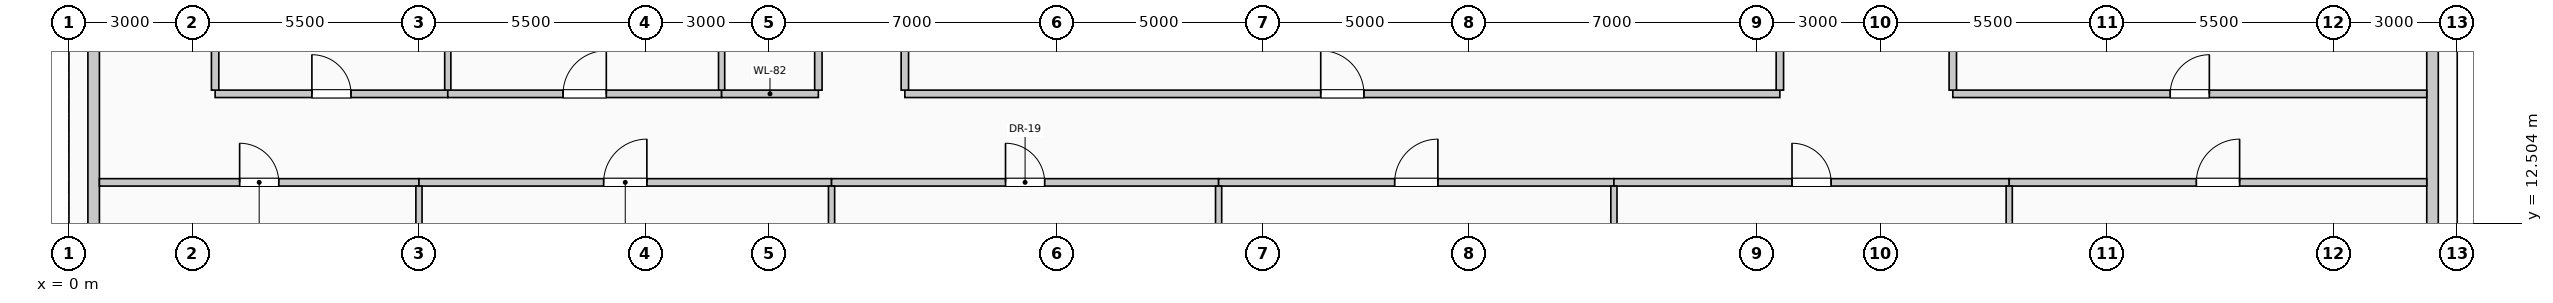
"""IFC4 building model, lengths in metres.
Left out: names, types, materials, properties, quantities, classifications, styles, units other than length and angle.
Written with IfcOpenShell. Run it as: python <this file> out.ifc"""

import sys

from ifc_helpers import new_model, si_unit, direction, frame, frame_2d, origin, place, context, subcontext, project, spatial, rectangle, extrude, element, fill, save


model = new_model("IFC4")
c1 = context("Model", 3, precision=1e-05, world=origin(), true_north=direction((0.0, 1.0)))
c2 = subcontext(c1, "Body", "Model", "MODEL_VIEW")
j1 = project(units=[si_unit("LENGTHUNIT", "METRE"), si_unit("PLANEANGLEUNIT", "RADIAN")], contexts=[c1])
p1 = place(None, origin())
s1 = spatial("IfcSite", under=j1, at=p1, CompositionType="ELEMENT")
p2 = place(p1, origin())
s2 = spatial("IfcBuilding", under=s1, at=p2, CompositionType="ELEMENT")
p3 = place(p2, frame((0.0, 0.0, 104.6)))
s3 = spatial("IfcBuildingStorey", under=s2, at=p3, CompositionType="ELEMENT", Elevation=104.6)
for number, where, z_axis, x_axis in (
    (1, (0.6, 10.445, 0.0), (0.0, 0.0, 1.0), (0.0, 1.0, 0.0)),
    (2, (57.4, 17.555, 0.0), (0.0, 0.0, 1.0), (0.0, -1.0, 0.0)),
):
    element("IfcWall", number, at=place(p3, frame(where, z_axis=z_axis, x_axis=x_axis)), inside=s3, PredefinedType="SOLIDWALL", context=c2, shape_type="SweptSolid", body=[
        extrude(rectangle(XDim=7.11, YDim=0.28, at=frame_2d((3.555, 0.0))), origin(), (0.0, 0.0, 1.0), 2.875),
    ])
p4 = place(p3, frame((0.74, 13.5, 0.0), z_axis=(0.0, 0.0, 1.0), x_axis=(1.0, 0.0, 0.0)))
e3 = element("IfcWall", 3, at=p4, inside=s3, PredefinedType="PARTITIONING", context=c2, shape_type="SweptSolid", body=[
    extrude(rectangle(XDim=7.76, YDim=0.18, at=frame_2d((3.88, 0.0))), origin(), (0.0, 0.0, 1.0), 3.725),
])
p5 = place(p4, frame((3.405, 0.0, 0.0)))
e4 = element("IfcOpeningElement", 4, at=p5, cuts=e3, PredefinedType="OPENING", context=c2, shape_type="SweptSolid", body=[
    extrude(rectangle(XDim=0.95, YDim=2.15, at=frame_2d((0.475, 1.075))), frame((0.0, 0.1, 0.0), z_axis=(0.0, -1.0, 0.0), x_axis=(1.0, 0.0, 0.0)), (0.0, 0.0, 1.0), 0.2),
])
p6 = place(p3, frame((8.5, 13.5, 0.0), z_axis=(0.0, 0.0, 1.0), x_axis=(1.0, 0.0, 0.0)))
e5 = element("IfcWall", 5, at=p6, inside=s3, PredefinedType="PARTITIONING", context=c2, shape_type="SweptSolid", body=[
    extrude(rectangle(XDim=10.02, YDim=0.18, at=frame_2d((5.01, 0.0))), origin(), (0.0, 0.0, 1.0), 3.725),
])
p7 = place(p6, frame((4.485, 0.0, 0.0)))
e6 = element("IfcOpeningElement", 6, at=p7, cuts=e5, PredefinedType="OPENING", context=c2, shape_type="SweptSolid", body=[
    extrude(rectangle(XDim=1.05, YDim=2.15, at=frame_2d((0.525, 1.075))), frame((0.0, 0.1, 0.0), z_axis=(0.0, -1.0, 0.0), x_axis=(1.0, 0.0, 0.0)), (0.0, 0.0, 1.0), 0.2),
])
p8 = place(p3, frame((18.52, 13.5, 0.0), z_axis=(0.0, 0.0, 1.0), x_axis=(1.0, 0.0, 0.0)))
e7 = element("IfcWall", 7, at=p8, inside=s3, PredefinedType="PARTITIONING", context=c2, shape_type="SweptSolid", body=[
    extrude(rectangle(XDim=9.4, YDim=0.18, at=frame_2d((4.7, 0.0))), origin(), (0.0, 0.0, 1.0), 3.725),
])
p9 = place(p8, frame((4.225, 0.0, 0.0)))
e8 = element("IfcOpeningElement", 8, at=p9, cuts=e7, PredefinedType="OPENING", context=c2, shape_type="SweptSolid", body=[
    extrude(rectangle(XDim=0.95, YDim=2.15, at=frame_2d((0.475, 1.075))), frame((0.0, 0.1, 0.0), z_axis=(0.0, -1.0, 0.0), x_axis=(1.0, 0.0, 0.0)), (0.0, 0.0, 1.0), 0.2),
])
p10 = place(p3, frame((27.92, 13.5, 0.0), z_axis=(0.0, 0.0, 1.0), x_axis=(1.0, 0.0, 0.0)))
e9 = element("IfcWall", 9, at=p10, inside=s3, PredefinedType="PARTITIONING", context=c2, shape_type="SweptSolid", body=[
    extrude(rectangle(XDim=9.6, YDim=0.18, at=frame_2d((4.8, 0.0))), origin(), (0.0, 0.0, 1.0), 3.725),
])
p11 = place(p10, frame((4.275, 0.0, 0.0)))
e10 = element("IfcOpeningElement", 10, at=p11, cuts=e9, PredefinedType="OPENING", context=c2, shape_type="SweptSolid", body=[
    extrude(rectangle(XDim=1.05, YDim=2.15, at=frame_2d((0.525, 1.075))), frame((0.0, 0.1, 0.0), z_axis=(0.0, -1.0, 0.0), x_axis=(1.0, 0.0, 0.0)), (0.0, 0.0, 1.0), 0.2),
])
p12 = place(p3, frame((37.52, 13.5, 0.0), z_axis=(0.0, 0.0, 1.0), x_axis=(1.0, 0.0, 0.0)))
e11 = element("IfcWall", 11, at=p12, inside=s3, PredefinedType="PARTITIONING", context=c2, shape_type="SweptSolid", body=[
    extrude(rectangle(XDim=9.6, YDim=0.18, at=frame_2d((4.8, 0.0))), origin(), (0.0, 0.0, 1.0), 3.725),
])
p13 = place(p12, frame((4.325, 0.0, 0.0)))
e12 = element("IfcOpeningElement", 12, at=p13, cuts=e11, PredefinedType="OPENING", context=c2, shape_type="SweptSolid", body=[
    extrude(rectangle(XDim=0.95, YDim=2.15, at=frame_2d((0.475, 1.075))), frame((0.0, 0.1, 0.0), z_axis=(0.0, -1.0, 0.0), x_axis=(1.0, 0.0, 0.0)), (0.0, 0.0, 1.0), 0.2),
])
p14 = place(p3, frame((47.12, 13.5, 0.0), z_axis=(0.0, 0.0, 1.0), x_axis=(1.0, 0.0, 0.0)))
e13 = element("IfcWall", 13, at=p14, inside=s3, PredefinedType="PARTITIONING", context=c2, shape_type="SweptSolid", body=[
    extrude(rectangle(XDim=10.14, YDim=0.18, at=frame_2d((5.07, 0.0))), origin(), (0.0, 0.0, 1.0), 3.725),
])
p15 = place(p14, frame((4.545, 0.0, 0.0)))
e14 = element("IfcOpeningElement", 14, at=p15, cuts=e13, PredefinedType="OPENING", context=c2, shape_type="SweptSolid", body=[
    extrude(rectangle(XDim=1.05, YDim=2.15, at=frame_2d((0.525, 1.075))), frame((0.0, 0.1, 0.0), z_axis=(0.0, -1.0, 0.0), x_axis=(1.0, 0.0, 0.0)), (0.0, 0.0, 1.0), 0.2),
])
p16 = place(p3, frame((3.55, 15.65, 0.0), z_axis=(0.0, 0.0, 1.0), x_axis=(1.0, 0.0, 0.0)))
e15 = element("IfcWall", 15, at=p16, inside=s3, PredefinedType="PARTITIONING", context=c2, shape_type="SweptSolid", body=[
    extrude(rectangle(XDim=5.65, YDim=0.18, at=frame_2d((2.825, 0.0))), origin(), (0.0, 0.0, 1.0), 3.725),
])
p17 = place(p16, frame((2.35, 0.0, 0.0)))
e16 = element("IfcOpeningElement", 16, at=p17, cuts=e15, PredefinedType="OPENING", context=c2, shape_type="SweptSolid", body=[
    extrude(rectangle(XDim=0.95, YDim=2.15, at=frame_2d((0.475, 1.075))), frame((0.0, 0.1, 0.0), z_axis=(0.0, -1.0, 0.0), x_axis=(1.0, 0.0, 0.0)), (0.0, 0.0, 1.0), 0.2),
])
p18 = place(p3, frame((9.2, 15.65, 0.0), z_axis=(0.0, 0.0, 1.0), x_axis=(1.0, 0.0, 0.0)))
e17 = element("IfcWall", 17, at=p18, inside=s3, PredefinedType="PARTITIONING", context=c2, shape_type="SweptSolid", body=[
    extrude(rectangle(XDim=6.65, YDim=0.18, at=frame_2d((3.325, 0.0))), origin(), (0.0, 0.0, 1.0), 3.725),
])
p19 = place(p18, frame((2.8, 0.0, 0.0)))
e18 = element("IfcOpeningElement", 18, at=p19, cuts=e17, PredefinedType="OPENING", context=c2, shape_type="SweptSolid", body=[
    extrude(rectangle(XDim=1.05, YDim=2.15, at=frame_2d((0.525, 1.075))), frame((0.0, 0.1, 0.0), z_axis=(0.0, -1.0, 0.0), x_axis=(1.0, 0.0, 0.0)), (0.0, 0.0, 1.0), 0.2),
])
p20 = place(p3, frame((15.85, 15.65, 0.0), z_axis=(0.0, 0.0, 1.0), x_axis=(1.0, 0.0, 0.0)))
e19 = element("IfcWall", 19, at=p20, inside=s3, PredefinedType="PARTITIONING", context=c2, shape_type="SweptSolid", body=[
    extrude(rectangle(XDim=2.35, YDim=0.18, at=frame_2d((1.175, 0.0))), origin(), (0.0, 0.0, 1.0), 3.725),
])
p21 = place(p3, frame((20.3, 15.65, 0.0), z_axis=(0.0, 0.0, 1.0), x_axis=(1.0, 0.0, 0.0)))
e20 = element("IfcWall", 20, at=p21, inside=s3, PredefinedType="PARTITIONING", context=c2, shape_type="SweptSolid", body=[
    extrude(rectangle(XDim=21.25, YDim=0.18, at=frame_2d((10.625, 0.0))), origin(), (0.0, 0.0, 1.0), 3.725),
])
p22 = place(p21, frame((10.1, 0.0, 0.0)))
e21 = element("IfcOpeningElement", 21, at=p22, cuts=e20, PredefinedType="OPENING", context=c2, shape_type="SweptSolid", body=[
    extrude(rectangle(XDim=1.05, YDim=2.15, at=frame_2d((0.525, 1.075))), frame((0.0, 0.1, 0.0), z_axis=(0.0, -1.0, 0.0), x_axis=(1.0, 0.0, 0.0)), (0.0, 0.0, 1.0), 0.2),
])
p23 = place(p3, frame((45.75, 15.65, 0.0), z_axis=(0.0, 0.0, 1.0), x_axis=(1.0, 0.0, 0.0)))
e22 = element("IfcWall", 22, at=p23, inside=s3, PredefinedType="PARTITIONING", context=c2, shape_type="SweptSolid", body=[
    extrude(rectangle(XDim=11.51, YDim=0.18, at=frame_2d((5.755, 0.0))), origin(), (0.0, 0.0, 1.0), 3.725),
])
p24 = place(p23, frame((5.28, 0.0, 0.0)))
e23 = element("IfcOpeningElement", 23, at=p24, cuts=e22, PredefinedType="OPENING", context=c2, shape_type="SweptSolid", body=[
    extrude(rectangle(XDim=0.95, YDim=2.15, at=frame_2d((0.475, 1.075))), frame((0.0, 0.1, 0.0), z_axis=(0.0, -1.0, 0.0), x_axis=(1.0, 0.0, 0.0)), (0.0, 0.0, 1.0), 0.2),
])
p25 = place(p3, frame((3.55, 15.74, 0.0), z_axis=(0.0, 0.0, 1.0), x_axis=(0.0, 1.0, 0.0)))
e24 = element("IfcWall", 24, at=p25, inside=s3, PredefinedType="PARTITIONING", context=c2, shape_type="SweptSolid", body=[
    extrude(rectangle(XDim=3.135, YDim=0.18, at=frame_2d((1.567, 0.0))), origin(), (0.0, 0.0, 1.0), 3.725),
])
p26 = place(p3, frame((8.5, 1.175, 0.0), z_axis=(0.0, 0.0, 1.0), x_axis=(0.0, 1.0, 0.0)))
e25 = element("IfcWall", 25, at=p26, inside=s3, PredefinedType="PARTITIONING", context=c2, shape_type="SweptSolid", body=[
    extrude(rectangle(XDim=12.235, YDim=0.15, at=frame_2d((6.117, 0.0))), origin(), (0.0, 0.0, 1.0), 3.725),
])
p27 = place(p3, frame((9.2, 15.74, 0.0), z_axis=(0.0, 0.0, 1.0), x_axis=(0.0, 1.0, 0.0)))
e26 = element("IfcWall", 26, at=p27, inside=s3, PredefinedType="PARTITIONING", context=c2, shape_type="SweptSolid", body=[
    extrude(rectangle(XDim=3.135, YDim=0.15, at=frame_2d((1.567, 0.0))), origin(), (0.0, 0.0, 1.0), 3.725),
])
p28 = place(p3, frame((15.85, 15.74, 0.0), z_axis=(0.0, 0.0, 1.0), x_axis=(0.0, 1.0, 0.0)))
e27 = element("IfcWall", 27, at=p28, inside=s3, PredefinedType="PARTITIONING", context=c2, shape_type="SweptSolid", body=[
    extrude(rectangle(XDim=1.76, YDim=0.15, at=frame_2d((0.88, 0.0))), origin(), (0.0, 0.0, 1.0), 3.725),
])
p29 = place(p3, frame((18.2, 15.74, 0.0), z_axis=(0.0, 0.0, 1.0), x_axis=(0.0, 1.0, 0.0)))
e28 = element("IfcWall", 28, at=p29, inside=s3, PredefinedType="PARTITIONING", context=c2, shape_type="SweptSolid", body=[
    extrude(rectangle(XDim=14.37, YDim=0.18, at=frame_2d((7.185, 0.0))), origin(), (0.0, 0.0, 1.0), 3.725),
])
p30 = place(p3, frame((18.52, 0.74, 0.0), z_axis=(0.0, 0.0, 1.0), x_axis=(0.0, 1.0, 0.0)))
e29 = element("IfcWall", 29, at=p30, inside=s3, PredefinedType="PARTITIONING", context=c2, shape_type="SweptSolid", body=[
    extrude(rectangle(XDim=12.67, YDim=0.15, at=frame_2d((6.335, 0.0))), origin(), (0.0, 0.0, 1.0), 3.725),
])
p31 = place(p3, frame((20.3, 15.74, 0.0), z_axis=(0.0, 0.0, 1.0), x_axis=(0.0, 1.0, 0.0)))
e30 = element("IfcWall", 30, at=p31, inside=s3, PredefinedType="PARTITIONING", context=c2, shape_type="SweptSolid", body=[
    extrude(rectangle(XDim=14.37, YDim=0.18, at=frame_2d((7.185, 0.0))), origin(), (0.0, 0.0, 1.0), 3.725),
])
for number, where, z_axis, x_axis in (
    (31, (27.92, 0.74, 0.0), (0.0, 0.0, 1.0), (0.0, 1.0, 0.0)),
    (32, (37.52, 0.74, 0.0), (0.0, 0.0, 1.0), (0.0, 1.0, 0.0)),
):
    element("IfcWall", number, at=place(p3, frame(where, z_axis=z_axis, x_axis=x_axis)), inside=s3, PredefinedType="PARTITIONING", context=c2, shape_type="SweptSolid", body=[
        extrude(rectangle(XDim=12.67, YDim=0.15, at=frame_2d((6.335, 0.0))), origin(), (0.0, 0.0, 1.0), 3.725),
    ])
p32 = place(p3, frame((41.55, 15.74, 0.0), z_axis=(0.0, 0.0, 1.0), x_axis=(0.0, 1.0, 0.0)))
e33 = element("IfcWall", 33, at=p32, inside=s3, PredefinedType="PARTITIONING", context=c2, shape_type="SweptSolid", body=[
    extrude(rectangle(XDim=1.76, YDim=0.18, at=frame_2d((0.88, 0.0))), origin(), (0.0, 0.0, 1.0), 3.07),
])
p33 = place(p3, frame((45.75, 15.74, 0.0), z_axis=(0.0, 0.0, 1.0), x_axis=(0.0, 1.0, 0.0)))
e34 = element("IfcWall", 34, at=p33, inside=s3, PredefinedType="PARTITIONING", context=c2, shape_type="SweptSolid", body=[
    extrude(rectangle(XDim=9.335, YDim=0.18, at=frame_2d((4.667, 0.0))), origin(), (0.0, 0.0, 1.0), 3.725),
])
p34 = place(p3, frame((47.12, 0.74, 0.0), z_axis=(0.0, 0.0, 1.0), x_axis=(0.0, 1.0, 0.0)))
e35 = element("IfcWall", 35, at=p34, inside=s3, PredefinedType="PARTITIONING", context=c2, shape_type="SweptSolid", body=[
    extrude(rectangle(XDim=12.67, YDim=0.15, at=frame_2d((6.335, 0.0))), origin(), (0.0, 0.0, 1.0), 3.725),
])
p35 = place(p5, origin())
e36 = element("IfcDoor", 36, at=p35, inside=s3, OperationType="SINGLE_SWING_LEFT", PredefinedType="DOOR", context=c2, shape_type="SweptSolid", body=[
    extrude(rectangle(XDim=0.95, YDim=2.15, at=frame_2d((0.475, 1.075))), frame((0.0, 0.025, 0.0), z_axis=(0.0, -1.0, 0.0), x_axis=(1.0, 0.0, 0.0)), (0.0, 0.0, 1.0), 0.05),
])
fill(e4, e36)
p36 = place(p7, origin())
e37 = element("IfcDoor", 37, at=p36, inside=s3, OperationType="SINGLE_SWING_RIGHT", PredefinedType="DOOR", context=c2, shape_type="SweptSolid", body=[
    extrude(rectangle(XDim=1.05, YDim=2.15, at=frame_2d((0.525, 1.075))), frame((0.0, 0.025, 0.0), z_axis=(0.0, -1.0, 0.0), x_axis=(1.0, 0.0, 0.0)), (0.0, 0.0, 1.0), 0.05),
])
fill(e6, e37)
p37 = place(p9, origin())
e38 = element("IfcDoor", 38, at=p37, inside=s3, OperationType="SINGLE_SWING_LEFT", PredefinedType="DOOR", context=c2, shape_type="SweptSolid", body=[
    extrude(rectangle(XDim=0.95, YDim=2.15, at=frame_2d((0.475, 1.075))), frame((0.0, 0.025, 0.0), z_axis=(0.0, -1.0, 0.0), x_axis=(1.0, 0.0, 0.0)), (0.0, 0.0, 1.0), 0.05),
])
fill(e8, e38)
p38 = place(p11, origin())
e39 = element("IfcDoor", 39, at=p38, inside=s3, OperationType="SINGLE_SWING_RIGHT", PredefinedType="DOOR", context=c2, shape_type="SweptSolid", body=[
    extrude(rectangle(XDim=1.05, YDim=2.15, at=frame_2d((0.525, 1.075))), frame((0.0, 0.025, 0.0), z_axis=(0.0, -1.0, 0.0), x_axis=(1.0, 0.0, 0.0)), (0.0, 0.0, 1.0), 0.05),
])
fill(e10, e39)
p39 = place(p13, origin())
e40 = element("IfcDoor", 40, at=p39, inside=s3, OperationType="SINGLE_SWING_LEFT", PredefinedType="DOOR", context=c2, shape_type="SweptSolid", body=[
    extrude(rectangle(XDim=0.95, YDim=2.15, at=frame_2d((0.475, 1.075))), frame((0.0, 0.025, 0.0), z_axis=(0.0, -1.0, 0.0), x_axis=(1.0, 0.0, 0.0)), (0.0, 0.0, 1.0), 0.05),
])
fill(e12, e40)
p40 = place(p15, origin())
e41 = element("IfcDoor", 41, at=p40, inside=s3, OperationType="SINGLE_SWING_RIGHT", PredefinedType="DOOR", context=c2, shape_type="SweptSolid", body=[
    extrude(rectangle(XDim=1.05, YDim=2.15, at=frame_2d((0.525, 1.075))), frame((0.0, 0.025, 0.0), z_axis=(0.0, -1.0, 0.0), x_axis=(1.0, 0.0, 0.0)), (0.0, 0.0, 1.0), 0.05),
])
fill(e14, e41)
p41 = place(p17, origin())
e42 = element("IfcDoor", 42, at=p41, inside=s3, OperationType="SINGLE_SWING_LEFT", PredefinedType="DOOR", context=c2, shape_type="SweptSolid", body=[
    extrude(rectangle(XDim=0.95, YDim=2.15, at=frame_2d((0.475, 1.075))), frame((0.0, 0.025, 0.0), z_axis=(0.0, -1.0, 0.0), x_axis=(1.0, 0.0, 0.0)), (0.0, 0.0, 1.0), 0.05),
])
fill(e16, e42)
p42 = place(p19, origin())
e43 = element("IfcDoor", 43, at=p42, inside=s3, OperationType="SINGLE_SWING_RIGHT", PredefinedType="DOOR", context=c2, shape_type="SweptSolid", body=[
    extrude(rectangle(XDim=1.05, YDim=2.15, at=frame_2d((0.525, 1.075))), frame((0.0, 0.025, 0.0), z_axis=(0.0, -1.0, 0.0), x_axis=(1.0, 0.0, 0.0)), (0.0, 0.0, 1.0), 0.05),
])
fill(e18, e43)
p43 = place(p22, origin())
e44 = element("IfcDoor", 44, at=p43, inside=s3, OperationType="SINGLE_SWING_LEFT", PredefinedType="DOOR", context=c2, shape_type="SweptSolid", body=[
    extrude(rectangle(XDim=1.05, YDim=2.15, at=frame_2d((0.525, 1.075))), frame((0.0, 0.025, 0.0), z_axis=(0.0, -1.0, 0.0), x_axis=(1.0, 0.0, 0.0)), (0.0, 0.0, 1.0), 0.05),
])
fill(e21, e44)
p44 = place(p24, origin())
e45 = element("IfcDoor", 45, at=p44, inside=s3, OperationType="SINGLE_SWING_RIGHT", PredefinedType="DOOR", context=c2, shape_type="SweptSolid", body=[
    extrude(rectangle(XDim=0.95, YDim=2.15, at=frame_2d((0.475, 1.075))), frame((0.0, 0.025, 0.0), z_axis=(0.0, -1.0, 0.0), x_axis=(1.0, 0.0, 0.0)), (0.0, 0.0, 1.0), 0.05),
])
fill(e23, e45)
save(model, sys.argv[1])
